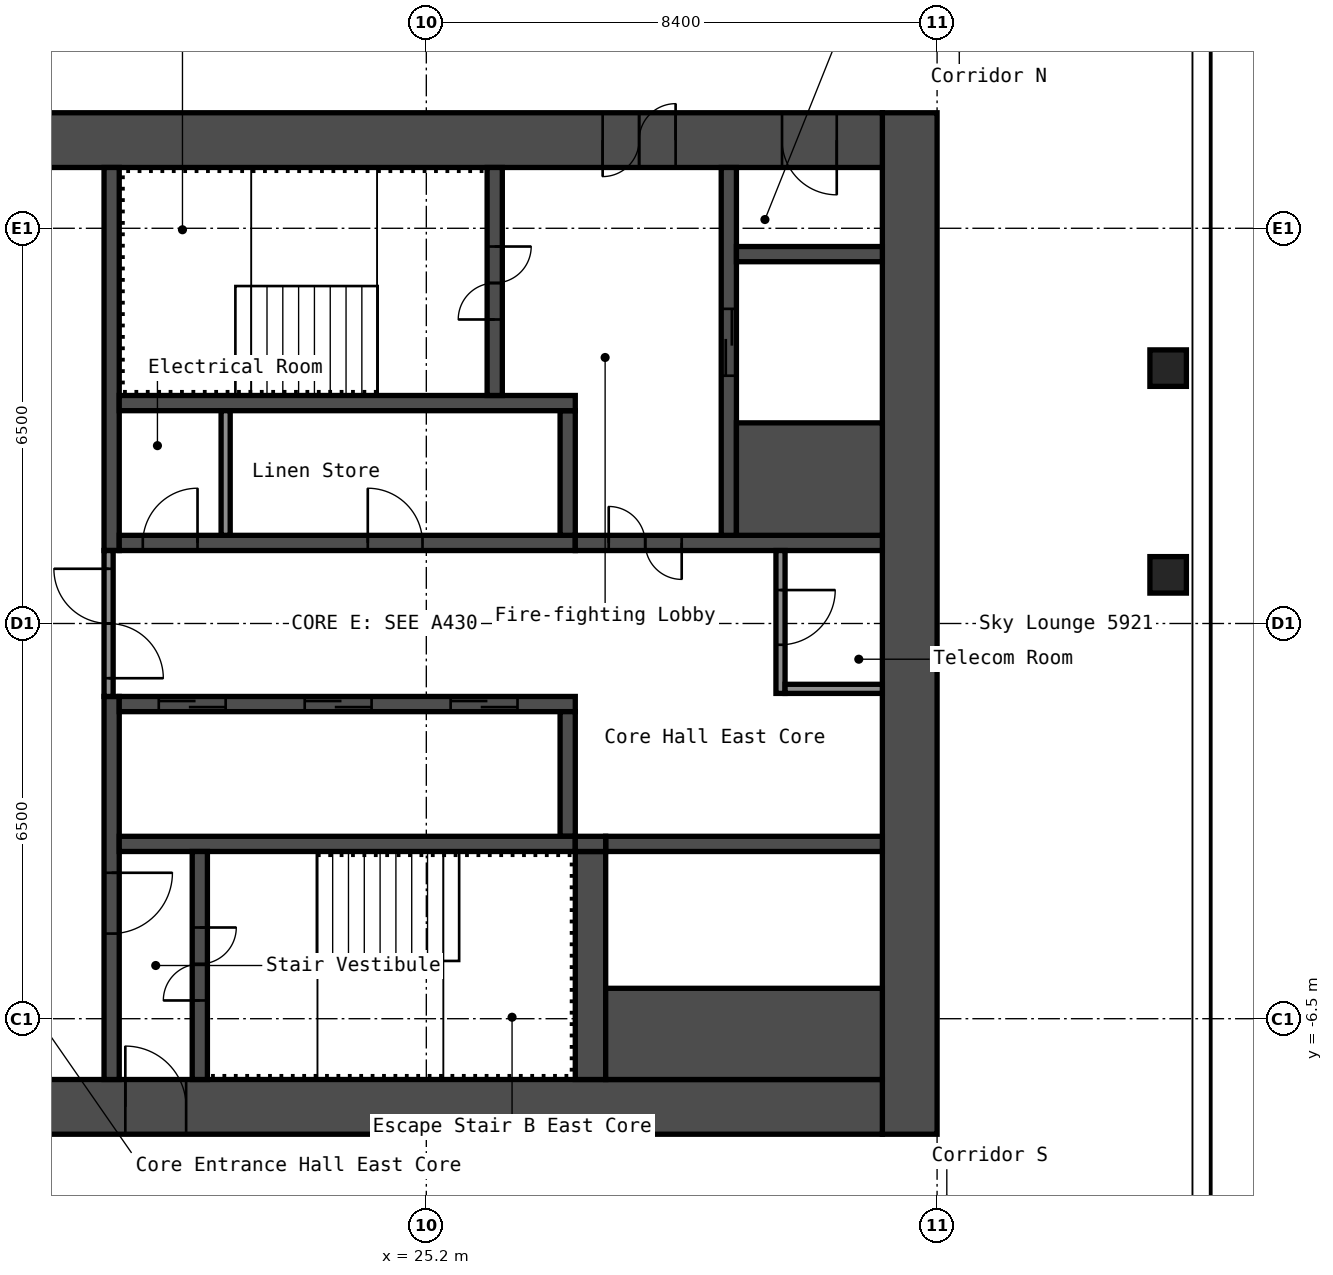
"""IFC4 building model, lengths in metres.
Left out: names, types, materials, properties, quantities, classifications, styles, units other than length and angle.
Written with IfcOpenShell. Run it as: python <this file> out.ifc"""

import sys

from ifc_helpers import new_model, si_unit, direction, frame, frame_2d, origin, origin_2d, place, context, subcontext, project, spatial, rectangle, hollow_rectangle, extrude, element, fill, save


model = new_model("IFC4")
c1 = context("Model", 3, precision=1e-05, world=origin(), true_north=direction((0.0, 1.0)))
c2 = subcontext(c1, "Body", "Model", "MODEL_VIEW")
j1 = project(units=[si_unit("LENGTHUNIT", "METRE"), si_unit("PLANEANGLEUNIT", "RADIAN")], contexts=[c1])
p1 = place(None, origin())
s1 = spatial("IfcSite", under=j1, at=p1, CompositionType="ELEMENT")
p2 = place(p1, origin())
s2 = spatial("IfcBuilding", under=s1, at=p2, CompositionType="ELEMENT")
p3 = place(p2, frame((0.0, 0.0, 209.0)))
s3 = spatial("IfcBuildingStorey", under=s2, at=p3, CompositionType="ELEMENT", Elevation=209.0)
for number, where, z_axis, x_axis in (
    (1, (37.4, 0.8, 0.0), (0.0, 0.0, 1.0), (1.0, 0.0, 0.0)),
    (2, (37.4, 4.2, 0.0), (0.0, 0.0, 1.0), (1.0, 0.0, 0.0)),
):
    element("IfcColumn", number, at=place(p3, frame(where, z_axis=z_axis, x_axis=x_axis)), inside=s3, PredefinedType="COLUMN", context=c2, shape_type="SweptSolid", body=[
        extrude(hollow_rectangle(XDim=0.6, YDim=0.6, WallThickness=0.025, InnerFilletRadius=0.038, OuterFilletRadius=0.062, at=origin_2d()), origin(), (0.0, 0.0, 1.0), 2.75),
    ])
p4 = place(p3, frame((33.15, -8.4, 0.0), z_axis=(0.0, 0.0, 1.0), x_axis=(0.0, 1.0, 0.0)))
e3 = element("IfcWall", 3, at=p4, inside=s3, PredefinedType="SHEAR", context=c2, shape_type="SweptSolid", body=[
    extrude(rectangle(XDim=16.8, YDim=0.9, at=frame_2d((8.4, 0.0))), origin(), (0.0, 0.0, 1.0), 2.75),
])
p5 = place(p3, frame((17.7, 7.95, 0.0), z_axis=(0.0, 0.0, 1.0), x_axis=(1.0, 0.0, 0.0)))
e4 = element("IfcWall", 4, at=p5, inside=s3, PredefinedType="SHEAR", context=c2, shape_type="SweptSolid", body=[
    extrude(rectangle(XDim=15.0, YDim=0.9, at=frame_2d((7.5, 0.0))), origin(), (0.0, 0.0, 1.0), 2.75),
])
p6 = place(p5, frame((10.4, 0.0, 0.0)))
e5 = element("IfcOpeningElement", 5, at=p6, cuts=e4, PredefinedType="OPENING", context=c2, shape_type="SweptSolid", body=[
    extrude(rectangle(XDim=1.2, YDim=2.1, at=frame_2d((0.6, 1.05))), frame((0.0, 0.46, 0.0), z_axis=(0.0, -1.0, 0.0), x_axis=(1.0, 0.0, 0.0)), (0.0, 0.0, 1.0), 0.92),
])
p7 = place(p5, frame((13.35, 0.0, 0.0)))
e6 = element("IfcOpeningElement", 6, at=p7, cuts=e4, PredefinedType="OPENING", context=c2, shape_type="SweptSolid", body=[
    extrude(rectangle(XDim=0.9, YDim=2.1, at=frame_2d((0.45, 1.05))), frame((0.0, 0.46, 0.0), z_axis=(0.0, -1.0, 0.0), x_axis=(1.0, 0.0, 0.0)), (0.0, 0.0, 1.0), 0.92),
])
p8 = place(p3, frame((17.7, -7.95, 0.0), z_axis=(0.0, 0.0, 1.0), x_axis=(1.0, 0.0, 0.0)))
e7 = element("IfcWall", 7, at=p8, inside=s3, PredefinedType="SHEAR", context=c2, shape_type="SweptSolid", body=[
    extrude(rectangle(XDim=15.0, YDim=0.9, at=frame_2d((7.5, 0.0))), origin(), (0.0, 0.0, 1.0), 2.75),
])
p9 = place(p8, frame((2.55, 0.0, 0.0)))
e8 = element("IfcOpeningElement", 8, at=p9, cuts=e7, PredefinedType="OPENING", context=c2, shape_type="SweptSolid", body=[
    extrude(rectangle(XDim=1.0, YDim=2.1, at=frame_2d((0.5, 1.05))), frame((0.0, 0.46, 0.0), z_axis=(0.0, -1.0, 0.0), x_axis=(1.0, 0.0, 0.0)), (0.0, 0.0, 1.0), 0.92),
])
p10 = place(p3, frame((20.025, 1.2, 0.0), z_axis=(0.0, 0.0, 1.0), x_axis=(0.0, 1.0, 0.0)))
e9 = element("IfcWall", 9, at=p10, inside=s3, PredefinedType="SHEAR", context=c2, shape_type="SweptSolid", body=[
    extrude(rectangle(XDim=6.3, YDim=0.25, at=frame_2d((3.15, 0.0))), origin(), (0.0, 0.0, 1.0), 2.75),
])
p11 = place(p3, frame((20.025, -7.5, 0.0), z_axis=(0.0, 0.0, 1.0), x_axis=(0.0, 1.0, 0.0)))
e10 = element("IfcWall", 10, at=p11, inside=s3, PredefinedType="SHEAR", context=c2, shape_type="SweptSolid", body=[
    extrude(rectangle(XDim=6.3, YDim=0.25, at=frame_2d((3.15, 0.0))), origin(), (0.0, 0.0, 1.0), 2.75),
])
p12 = place(p11, frame((2.4, 0.0, 0.0)))
e11 = element("IfcOpeningElement", 11, at=p12, cuts=e10, PredefinedType="OPENING", context=c2, shape_type="SweptSolid", body=[
    extrude(rectangle(XDim=1.0, YDim=2.1, at=frame_2d((0.5, 1.05))), frame((0.0, 0.135, 0.0), z_axis=(0.0, -1.0, 0.0), x_axis=(1.0, 0.0, 0.0)), (0.0, 0.0, 1.0), 0.27),
])
p13 = place(p3, frame((20.15, 1.325, 0.0), z_axis=(0.0, 0.0, 1.0), x_axis=(1.0, 0.0, 0.0)))
e12 = element("IfcWall", 12, at=p13, inside=s3, PredefinedType="SHEAR", context=c2, shape_type="SweptSolid", body=[
    extrude(rectangle(XDim=7.5, YDim=0.25, at=frame_2d((3.75, 0.0))), origin(), (0.0, 0.0, 1.0), 2.75),
])
p14 = place(p13, frame((0.387, 0.0, 0.0)))
e13 = element("IfcOpeningElement", 13, at=p14, cuts=e12, PredefinedType="OPENING", context=c2, shape_type="SweptSolid", body=[
    extrude(rectangle(XDim=0.9, YDim=2.1, at=frame_2d((0.45, 1.05))), frame((0.0, 0.135, 0.0), z_axis=(0.0, -1.0, 0.0), x_axis=(1.0, 0.0, 0.0)), (0.0, 0.0, 1.0), 0.27),
])
p15 = place(p13, frame((4.087, 0.0, 0.0)))
e14 = element("IfcOpeningElement", 14, at=p15, cuts=e12, PredefinedType="OPENING", context=c2, shape_type="SweptSolid", body=[
    extrude(rectangle(XDim=0.9, YDim=2.1, at=frame_2d((0.45, 1.05))), frame((0.0, 0.135, 0.0), z_axis=(0.0, -1.0, 0.0), x_axis=(1.0, 0.0, 0.0)), (0.0, 0.0, 1.0), 0.27),
])
p16 = place(p3, frame((27.525, 1.45, 0.0), z_axis=(0.0, 0.0, 1.0), x_axis=(0.0, 1.0, 0.0)))
e15 = element("IfcWall", 15, at=p16, inside=s3, PredefinedType="SHEAR", context=c2, shape_type="SweptSolid", body=[
    extrude(rectangle(XDim=2.05, YDim=0.25, at=frame_2d((1.025, 0.0))), origin(), (0.0, 0.0, 1.0), 2.75),
])
p17 = place(p3, frame((20.15, 3.625, 0.0), z_axis=(0.0, 0.0, 1.0), x_axis=(1.0, 0.0, 0.0)))
e16 = element("IfcWall", 16, at=p17, inside=s3, PredefinedType="SHEAR", context=c2, shape_type="SweptSolid", body=[
    extrude(rectangle(XDim=7.5, YDim=0.25, at=frame_2d((3.75, 0.0))), origin(), (0.0, 0.0, 1.0), 2.75),
])
p18 = place(p3, frame((26.325, 3.75, 0.0), z_axis=(0.0, 0.0, 1.0), x_axis=(0.0, 1.0, 0.0)))
e17 = element("IfcWall", 17, at=p18, inside=s3, PredefinedType="SHEAR", context=c2, shape_type="SweptSolid", body=[
    extrude(rectangle(XDim=3.75, YDim=0.25, at=frame_2d((1.875, 0.0))), origin(), (0.0, 0.0, 1.0), 2.75),
])
p19 = place(p18, frame((1.25, 0.0, 0.0)))
e18 = element("IfcOpeningElement", 18, at=p19, cuts=e17, PredefinedType="OPENING", context=c2, shape_type="SweptSolid", body=[
    extrude(rectangle(XDim=1.2, YDim=2.1, at=frame_2d((0.6, 1.05))), frame((0.0, 0.135, 0.0), z_axis=(0.0, -1.0, 0.0), x_axis=(1.0, 0.0, 0.0)), (0.0, 0.0, 1.0), 0.27),
])
p20 = place(p3, frame((27.65, 1.325, 0.0), z_axis=(0.0, 0.0, 1.0), x_axis=(1.0, 0.0, 0.0)))
e19 = element("IfcWall", 19, at=p20, inside=s3, PredefinedType="SHEAR", context=c2, shape_type="SweptSolid", body=[
    extrude(rectangle(XDim=5.05, YDim=0.25, at=frame_2d((2.525, 0.0))), origin(), (0.0, 0.0, 1.0), 2.75),
])
p21 = place(p20, frame((0.55, 0.0, 0.0)))
e20 = element("IfcOpeningElement", 20, at=p21, cuts=e19, PredefinedType="OPENING", context=c2, shape_type="SweptSolid", body=[
    extrude(rectangle(XDim=1.2, YDim=2.1, at=frame_2d((0.6, 1.05))), frame((0.0, 0.135, 0.0), z_axis=(0.0, -1.0, 0.0), x_axis=(1.0, 0.0, 0.0)), (0.0, 0.0, 1.0), 0.27),
])
p22 = place(p3, frame((30.175, 1.45, 0.0), z_axis=(0.0, 0.0, 1.0), x_axis=(0.0, 1.0, 0.0)))
e21 = element("IfcWall", 21, at=p22, inside=s3, PredefinedType="SHEAR", context=c2, shape_type="SweptSolid", body=[
    extrude(rectangle(XDim=6.05, YDim=0.25, at=frame_2d((3.025, 0.0))), origin(), (0.0, 0.0, 1.0), 2.75),
])
p23 = place(p22, frame((2.625, 0.0, 0.0)))
e22 = element("IfcOpeningElement", 22, at=p23, cuts=e21, PredefinedType="OPENING", context=c2, shape_type="SweptSolid", body=[
    extrude(rectangle(XDim=1.1, YDim=2.1, at=frame_2d((0.55, 1.05))), frame((0.0, 0.135, 0.0), z_axis=(0.0, -1.0, 0.0), x_axis=(1.0, 0.0, 0.0)), (0.0, 0.0, 1.0), 0.27),
])
p24 = place(p3, frame((30.3, 2.375, 0.0), z_axis=(0.0, 0.0, 1.0), x_axis=(1.0, 0.0, 0.0)))
e23 = element("IfcWall", 23, at=p24, inside=s3, PredefinedType="SHEAR", context=c2, shape_type="SweptSolid", body=[
    extrude(rectangle(XDim=2.4, YDim=1.85, at=frame_2d((1.2, 0.0))), origin(), (0.0, 0.0, 1.0), 2.75),
])
p25 = place(p3, frame((30.3, 6.075, 0.0), z_axis=(0.0, 0.0, 1.0), x_axis=(1.0, 0.0, 0.0)))
e24 = element("IfcWall", 24, at=p25, inside=s3, PredefinedType="SHEAR", context=c2, shape_type="SweptSolid", body=[
    extrude(rectangle(XDim=2.4, YDim=0.25, at=frame_2d((1.2, 0.0))), origin(), (0.0, 0.0, 1.0), 2.75),
])
p26 = place(p3, frame((20.15, -1.325, 0.0), z_axis=(0.0, 0.0, 1.0), x_axis=(1.0, 0.0, 0.0)))
e25 = element("IfcWall", 25, at=p26, inside=s3, PredefinedType="SHEAR", context=c2, shape_type="SweptSolid", body=[
    extrude(rectangle(XDim=7.5, YDim=0.25, at=frame_2d((3.75, 0.0))), origin(), (0.0, 0.0, 1.0), 2.75),
])
p27 = place(p26, frame((0.65, 0.0, 0.0)))
e26 = element("IfcOpeningElement", 26, at=p27, cuts=e25, PredefinedType="OPENING", context=c2, shape_type="SweptSolid", body=[
    extrude(rectangle(XDim=1.1, YDim=2.1, at=frame_2d((0.55, 1.05))), frame((0.0, 0.135, 0.0), z_axis=(0.0, -1.0, 0.0), x_axis=(1.0, 0.0, 0.0)), (0.0, 0.0, 1.0), 0.27),
])
p28 = place(p26, frame((3.05, 0.0, 0.0)))
e27 = element("IfcOpeningElement", 27, at=p28, cuts=e25, PredefinedType="OPENING", context=c2, shape_type="SweptSolid", body=[
    extrude(rectangle(XDim=1.1, YDim=2.1, at=frame_2d((0.55, 1.05))), frame((0.0, 0.135, 0.0), z_axis=(0.0, -1.0, 0.0), x_axis=(1.0, 0.0, 0.0)), (0.0, 0.0, 1.0), 0.27),
])
p29 = place(p26, frame((5.45, 0.0, 0.0)))
e28 = element("IfcOpeningElement", 28, at=p29, cuts=e25, PredefinedType="OPENING", context=c2, shape_type="SweptSolid", body=[
    extrude(rectangle(XDim=1.1, YDim=2.1, at=frame_2d((0.55, 1.05))), frame((0.0, 0.135, 0.0), z_axis=(0.0, -1.0, 0.0), x_axis=(1.0, 0.0, 0.0)), (0.0, 0.0, 1.0), 0.27),
])
p30 = place(p3, frame((27.525, -3.5, 0.0), z_axis=(0.0, 0.0, 1.0), x_axis=(0.0, 1.0, 0.0)))
e29 = element("IfcWall", 29, at=p30, inside=s3, PredefinedType="SHEAR", context=c2, shape_type="SweptSolid", body=[
    extrude(rectangle(XDim=2.05, YDim=0.25, at=frame_2d((1.025, 0.0))), origin(), (0.0, 0.0, 1.0), 2.75),
])
p31 = place(p3, frame((20.15, -3.625, 0.0), z_axis=(0.0, 0.0, 1.0), x_axis=(1.0, 0.0, 0.0)))
e30 = element("IfcWall", 30, at=p31, inside=s3, PredefinedType="SHEAR", context=c2, shape_type="SweptSolid", body=[
    extrude(rectangle(XDim=7.5, YDim=0.25, at=frame_2d((3.75, 0.0))), origin(), (0.0, 0.0, 1.0), 2.75),
])
p32 = place(p3, frame((21.475, -7.5, 0.0), z_axis=(0.0, 0.0, 1.0), x_axis=(0.0, 1.0, 0.0)))
e31 = element("IfcWall", 31, at=p32, inside=s3, PredefinedType="SHEAR", context=c2, shape_type="SweptSolid", body=[
    extrude(rectangle(XDim=3.75, YDim=0.25, at=frame_2d((1.875, 0.0))), origin(), (0.0, 0.0, 1.0), 2.75),
])
p33 = place(p32, frame((1.3, 0.0, 0.0)))
e32 = element("IfcOpeningElement", 32, at=p33, cuts=e31, PredefinedType="OPENING", context=c2, shape_type="SweptSolid", body=[
    extrude(rectangle(XDim=1.2, YDim=2.1, at=frame_2d((0.6, 1.05))), frame((0.0, 0.135, 0.0), z_axis=(0.0, -1.0, 0.0), x_axis=(1.0, 0.0, 0.0)), (0.0, 0.0, 1.0), 0.27),
])
p34 = place(p3, frame((27.9, -7.5, 0.0), z_axis=(0.0, 0.0, 1.0), x_axis=(0.0, 1.0, 0.0)))
e33 = element("IfcWall", 33, at=p34, inside=s3, PredefinedType="SHEAR", context=c2, shape_type="SweptSolid", body=[
    extrude(rectangle(XDim=3.75, YDim=0.5, at=frame_2d((1.875, 0.0))), origin(), (0.0, 0.0, 1.0), 2.75),
])
p35 = place(p3, frame((28.15, -3.625, 0.0), z_axis=(0.0, 0.0, 1.0), x_axis=(1.0, 0.0, 0.0)))
e34 = element("IfcWall", 34, at=p35, inside=s3, PredefinedType="SHEAR", context=c2, shape_type="SweptSolid", body=[
    extrude(rectangle(XDim=4.55, YDim=0.25, at=frame_2d((2.275, 0.0))), origin(), (0.0, 0.0, 1.0), 2.75),
])
p36 = place(p3, frame((28.15, -6.75, 0.0), z_axis=(0.0, 0.0, 1.0), x_axis=(1.0, 0.0, 0.0)))
e35 = element("IfcWall", 35, at=p36, inside=s3, PredefinedType="SHEAR", context=c2, shape_type="SweptSolid", body=[
    extrude(rectangle(XDim=4.55, YDim=1.5, at=frame_2d((2.275, 0.0))), origin(), (0.0, 0.0, 1.0), 2.75),
])
p37 = place(p3, frame((27.65, -3.625, 0.0), z_axis=(0.0, 0.0, 1.0), x_axis=(1.0, 0.0, 0.0)))
e36 = element("IfcWall", 36, at=p37, inside=s3, PredefinedType="SHEAR", context=c2, shape_type="SweptSolid", body=[
    extrude(rectangle(XDim=0.5, YDim=0.25, at=frame_2d((0.25, 0.0))), origin(), (0.0, 0.0, 1.0), 2.75),
])
p38 = place(p3, frame((19.975, -1.2, 0.0), z_axis=(0.0, 0.0, 1.0), x_axis=(0.0, 1.0, 0.0)))
e37 = element("IfcWall", 37, at=p38, inside=s3, PredefinedType="PARTITIONING", context=c2, shape_type="SweptSolid", body=[
    extrude(rectangle(XDim=2.4, YDim=0.15, at=frame_2d((1.2, 0.0))), origin(), (0.0, 0.0, 1.0), 2.75),
])
p39 = place(p38, frame((0.3, 0.0, 0.0)))
e38 = element("IfcOpeningElement", 38, at=p39, cuts=e37, PredefinedType="OPENING", context=c2, shape_type="SweptSolid", body=[
    extrude(rectangle(XDim=1.8, YDim=2.1, at=frame_2d((0.9, 1.05))), frame((0.0, 0.085, 0.0), z_axis=(0.0, -1.0, 0.0), x_axis=(1.0, 0.0, 0.0)), (0.0, 0.0, 1.0), 0.17),
])
p40 = place(p3, frame((31.025, -1.15, 0.0), z_axis=(0.0, 0.0, 1.0), x_axis=(0.0, 1.0, 0.0)))
e39 = element("IfcWall", 39, at=p40, inside=s3, PredefinedType="PARTITIONING", context=c2, shape_type="SweptSolid", body=[
    extrude(rectangle(XDim=2.35, YDim=0.15, at=frame_2d((1.175, 0.0))), origin(), (0.0, 0.0, 1.0), 2.75),
])
p41 = place(p40, frame((0.8, 0.0, 0.0)))
e40 = element("IfcOpeningElement", 40, at=p41, cuts=e39, PredefinedType="OPENING", context=c2, shape_type="SweptSolid", body=[
    extrude(rectangle(XDim=0.9, YDim=2.1, at=frame_2d((0.45, 1.05))), frame((0.0, 0.085, 0.0), z_axis=(0.0, -1.0, 0.0), x_axis=(1.0, 0.0, 0.0)), (0.0, 0.0, 1.0), 0.17),
])
p42 = place(p3, frame((31.1, -1.075, 0.0), z_axis=(0.0, 0.0, 1.0), x_axis=(1.0, 0.0, 0.0)))
e41 = element("IfcWall", 41, at=p42, inside=s3, PredefinedType="PARTITIONING", context=c2, shape_type="SweptSolid", body=[
    extrude(rectangle(XDim=1.6, YDim=0.15, at=frame_2d((0.8, 0.0))), origin(), (0.0, 0.0, 1.0), 2.75),
])
p43 = place(p3, frame((21.9, 1.45, 0.0), z_axis=(0.0, 0.0, 1.0), x_axis=(0.0, 1.0, 0.0)))
e42 = element("IfcWall", 42, at=p43, inside=s3, PredefinedType="PARTITIONING", context=c2, shape_type="SweptSolid", body=[
    extrude(rectangle(XDim=2.05, YDim=0.15, at=frame_2d((1.025, 0.0))), origin(), (0.0, 0.0, 1.0), 2.75),
])
p44 = place(p6, origin())
e43 = element("IfcDoor", 43, at=p44, inside=s3, OperationType="DOUBLE_DOOR_SINGLE_SWING", PredefinedType="DOOR", context=c2, shape_type="SweptSolid", body=[
    extrude(rectangle(XDim=1.2, YDim=2.1, at=frame_2d((0.6, 1.05))), frame((0.0, 0.025, 0.0), z_axis=(0.0, -1.0, 0.0), x_axis=(1.0, 0.0, 0.0)), (0.0, 0.0, 1.0), 0.05),
])
fill(e5, e43)
p45 = place(p7, origin())
e44 = element("IfcDoor", 44, at=p45, inside=s3, OperationType="SINGLE_SWING_RIGHT", PredefinedType="DOOR", context=c2, shape_type="SweptSolid", body=[
    extrude(rectangle(XDim=0.9, YDim=2.1, at=frame_2d((0.45, 1.05))), frame((0.0, 0.025, 0.0), z_axis=(0.0, -1.0, 0.0), x_axis=(1.0, 0.0, 0.0)), (0.0, 0.0, 1.0), 0.05),
])
fill(e6, e44)
p46 = place(p9, origin())
e45 = element("IfcDoor", 45, at=p46, inside=s3, OperationType="SINGLE_SWING_RIGHT", PredefinedType="DOOR", context=c2, shape_type="SweptSolid", body=[
    extrude(rectangle(XDim=1.0, YDim=2.1, at=frame_2d((0.5, 1.05))), frame((0.0, 0.025, 0.0), z_axis=(0.0, -1.0, 0.0), x_axis=(1.0, 0.0, 0.0)), (0.0, 0.0, 1.0), 0.05),
])
fill(e8, e45)
p47 = place(p19, origin())
e46 = element("IfcDoor", 46, at=p47, inside=s3, OperationType="DOUBLE_DOOR_SINGLE_SWING", PredefinedType="DOOR", context=c2, shape_type="SweptSolid", body=[
    extrude(rectangle(XDim=1.2, YDim=2.1, at=frame_2d((0.6, 1.05))), frame((0.0, 0.025, 0.0), z_axis=(0.0, -1.0, 0.0), x_axis=(1.0, 0.0, 0.0)), (0.0, 0.0, 1.0), 0.05),
])
fill(e18, e46)
p48 = place(p33, origin())
e47 = element("IfcDoor", 47, at=p48, inside=s3, OperationType="DOUBLE_DOOR_SINGLE_SWING", PredefinedType="DOOR", context=c2, shape_type="SweptSolid", body=[
    extrude(rectangle(XDim=1.2, YDim=2.1, at=frame_2d((0.6, 1.05))), frame((0.0, 0.025, 0.0), z_axis=(0.0, -1.0, 0.0), x_axis=(1.0, 0.0, 0.0)), (0.0, 0.0, 1.0), 0.05),
])
fill(e32, e47)
p49 = place(p12, origin())
e48 = element("IfcDoor", 48, at=p49, inside=s3, OperationType="SINGLE_SWING_RIGHT", PredefinedType="DOOR", context=c2, shape_type="SweptSolid", body=[
    extrude(rectangle(XDim=1.0, YDim=2.1, at=frame_2d((0.5, 1.05))), frame((0.0, 0.025, 0.0), z_axis=(0.0, -1.0, 0.0), x_axis=(1.0, 0.0, 0.0)), (0.0, 0.0, 1.0), 0.05),
])
fill(e11, e48)
p50 = place(p21, origin())
e49 = element("IfcDoor", 49, at=p50, inside=s3, OperationType="DOUBLE_DOOR_SINGLE_SWING", PredefinedType="DOOR", context=c2, shape_type="SweptSolid", body=[
    extrude(rectangle(XDim=1.2, YDim=2.1, at=frame_2d((0.6, 1.05))), frame((0.0, 0.025, 0.0), z_axis=(0.0, -1.0, 0.0), x_axis=(1.0, 0.0, 0.0)), (0.0, 0.0, 1.0), 0.05),
])
fill(e20, e49)
p51 = place(p39, origin())
e50 = element("IfcDoor", 50, at=p51, inside=s3, OperationType="DOUBLE_DOOR_SINGLE_SWING", PredefinedType="DOOR", context=c2, shape_type="SweptSolid", body=[
    extrude(rectangle(XDim=1.8, YDim=2.1, at=frame_2d((0.9, 1.05))), frame((0.0, 0.025, 0.0), z_axis=(0.0, -1.0, 0.0), x_axis=(1.0, 0.0, 0.0)), (0.0, 0.0, 1.0), 0.05),
])
fill(e38, e50)
p52 = place(p41, origin())
e51 = element("IfcDoor", 51, at=p52, inside=s3, OperationType="SINGLE_SWING_RIGHT", PredefinedType="DOOR", context=c2, shape_type="SweptSolid", body=[
    extrude(rectangle(XDim=0.9, YDim=2.1, at=frame_2d((0.45, 1.05))), frame((0.0, 0.025, 0.0), z_axis=(0.0, -1.0, 0.0), x_axis=(1.0, 0.0, 0.0)), (0.0, 0.0, 1.0), 0.05),
])
fill(e40, e51)
p53 = place(p14, origin())
e52 = element("IfcDoor", 52, at=p53, inside=s3, OperationType="SINGLE_SWING_LEFT", PredefinedType="DOOR", context=c2, shape_type="SweptSolid", body=[
    extrude(rectangle(XDim=0.9, YDim=2.1, at=frame_2d((0.45, 1.05))), frame((0.0, 0.025, 0.0), z_axis=(0.0, -1.0, 0.0), x_axis=(1.0, 0.0, 0.0)), (0.0, 0.0, 1.0), 0.05),
])
fill(e13, e52)
p54 = place(p15, origin())
e53 = element("IfcDoor", 53, at=p54, inside=s3, OperationType="SINGLE_SWING_RIGHT", PredefinedType="DOOR", context=c2, shape_type="SweptSolid", body=[
    extrude(rectangle(XDim=0.9, YDim=2.1, at=frame_2d((0.45, 1.05))), frame((0.0, 0.025, 0.0), z_axis=(0.0, -1.0, 0.0), x_axis=(1.0, 0.0, 0.0)), (0.0, 0.0, 1.0), 0.05),
])
fill(e14, e53)
p55 = place(p27, origin())
e54 = element("IfcDoor", 54, at=p55, inside=s3, OperationType="DOUBLE_DOOR_SLIDING", PredefinedType="DOOR", context=c2, shape_type="SweptSolid", body=[
    extrude(rectangle(XDim=1.1, YDim=2.1, at=frame_2d((0.55, 1.05))), frame((0.0, 0.025, 0.0), z_axis=(0.0, -1.0, 0.0), x_axis=(1.0, 0.0, 0.0)), (0.0, 0.0, 1.0), 0.05),
])
fill(e26, e54)
p56 = place(p28, origin())
e55 = element("IfcDoor", 55, at=p56, inside=s3, OperationType="DOUBLE_DOOR_SLIDING", PredefinedType="DOOR", context=c2, shape_type="SweptSolid", body=[
    extrude(rectangle(XDim=1.1, YDim=2.1, at=frame_2d((0.55, 1.05))), frame((0.0, 0.025, 0.0), z_axis=(0.0, -1.0, 0.0), x_axis=(1.0, 0.0, 0.0)), (0.0, 0.0, 1.0), 0.05),
])
fill(e27, e55)
p57 = place(p29, origin())
e56 = element("IfcDoor", 56, at=p57, inside=s3, OperationType="DOUBLE_DOOR_SLIDING", PredefinedType="DOOR", context=c2, shape_type="SweptSolid", body=[
    extrude(rectangle(XDim=1.1, YDim=2.1, at=frame_2d((0.55, 1.05))), frame((0.0, 0.025, 0.0), z_axis=(0.0, -1.0, 0.0), x_axis=(1.0, 0.0, 0.0)), (0.0, 0.0, 1.0), 0.05),
])
fill(e28, e56)
p58 = place(p23, origin())
e57 = element("IfcDoor", 57, at=p58, inside=s3, OperationType="DOUBLE_DOOR_SLIDING", PredefinedType="DOOR", context=c2, shape_type="SweptSolid", body=[
    extrude(rectangle(XDim=1.1, YDim=2.1, at=frame_2d((0.55, 1.05))), frame((0.0, 0.025, 0.0), z_axis=(0.0, -1.0, 0.0), x_axis=(1.0, 0.0, 0.0)), (0.0, 0.0, 1.0), 0.05),
])
fill(e22, e57)
save(model, sys.argv[1])
